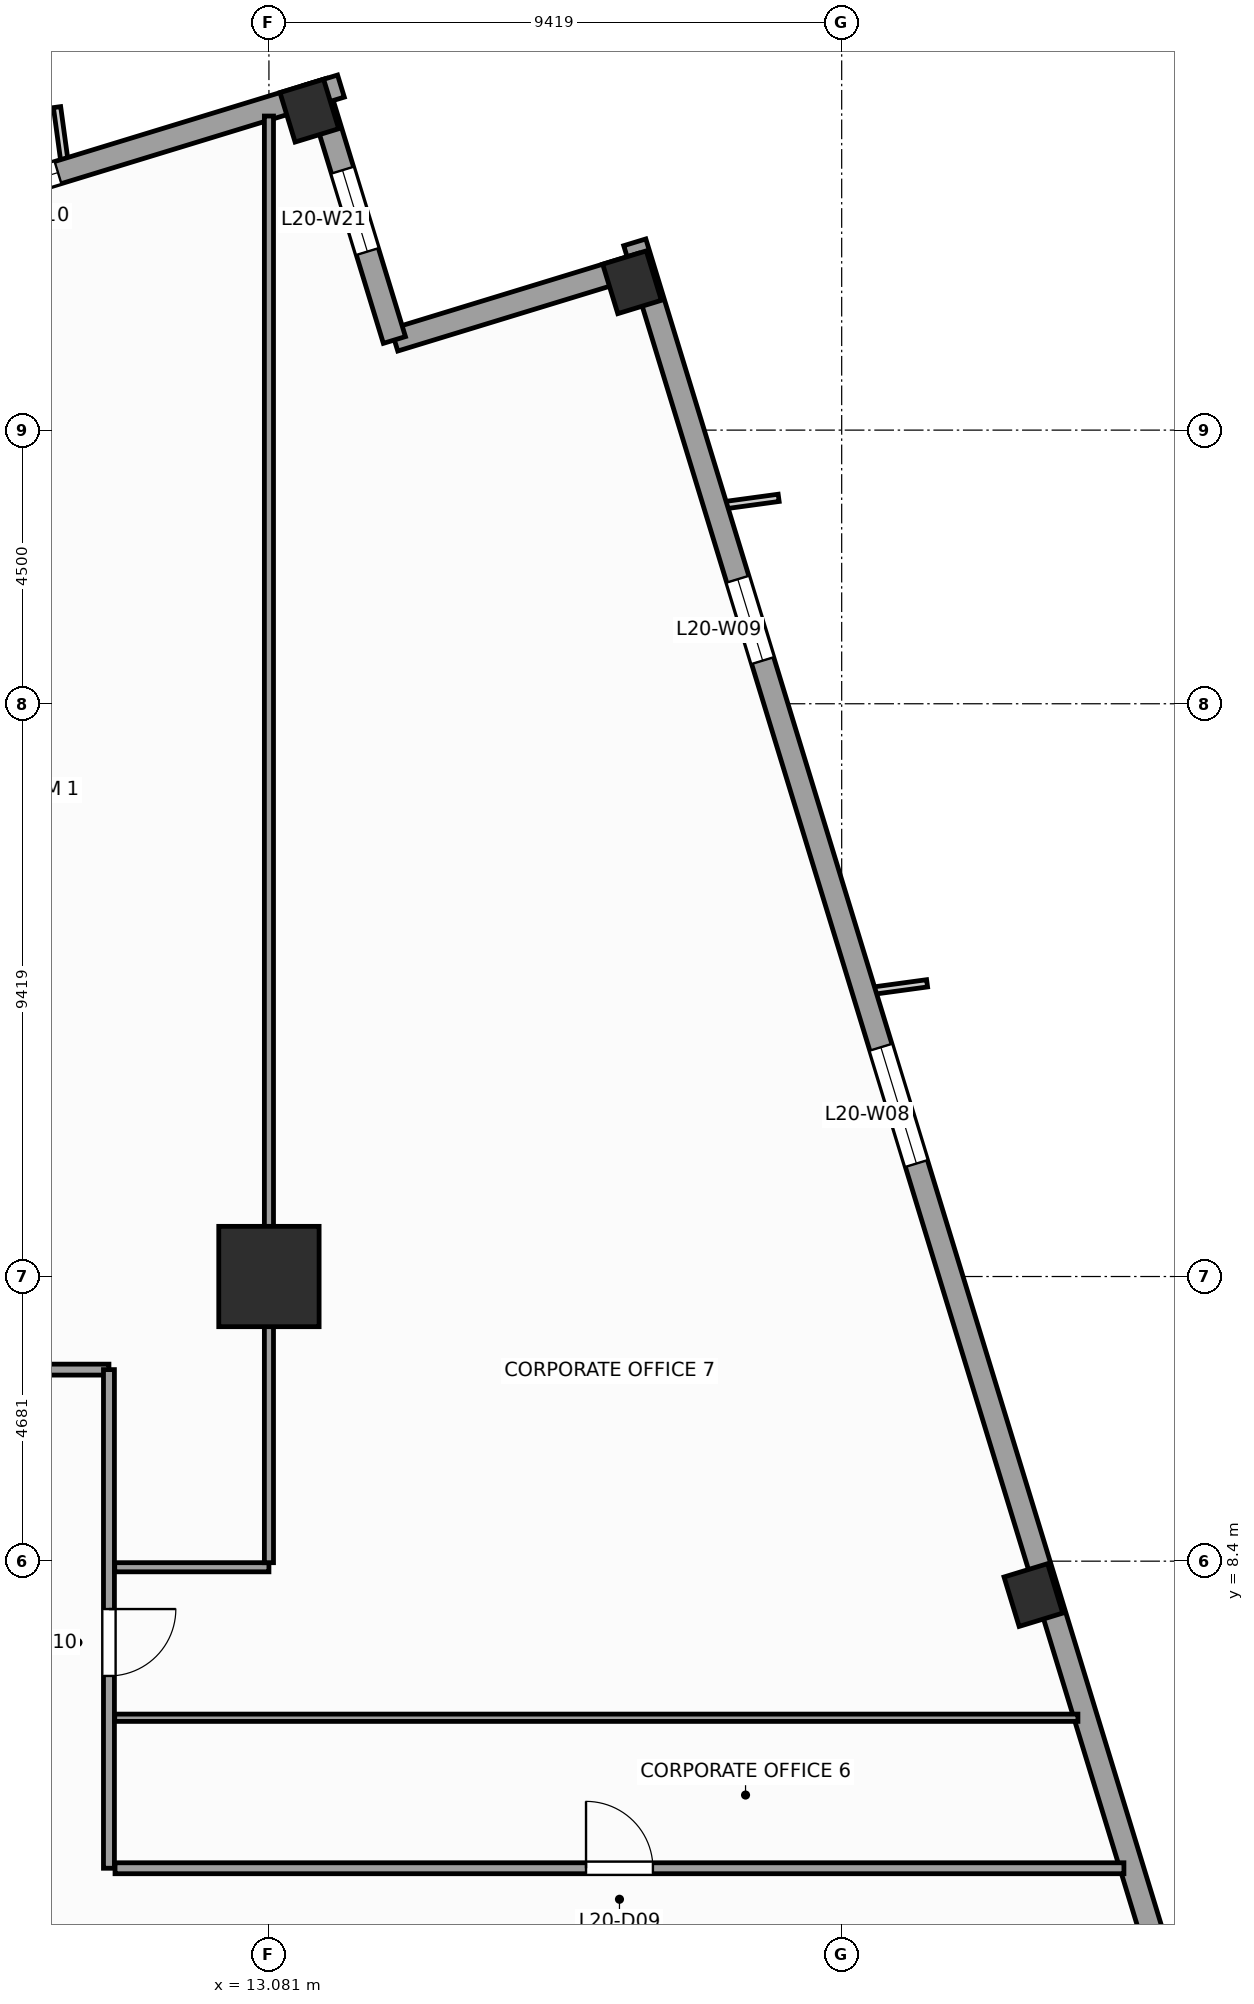
"""IFC4 building model, lengths in metres.
Left out: names, types, materials, properties, quantities, classifications, styles, units other than length and angle.
Written with IfcOpenShell. Run it as: python <this file> out.ifc"""

import sys

from ifc_helpers import new_model, si_unit, direction, frame, frame_2d, origin, origin_2d, place, context, subcontext, project, spatial, rectangle, extrude, source, transform, mapped, element, fill, save


model = new_model("IFC4")
c1 = context("Model", 3, precision=1e-05, world=origin(), true_north=direction((0.0, 1.0)))
c2 = subcontext(c1, "Body", "Model", "MODEL_VIEW")
j1 = project(units=[si_unit("LENGTHUNIT", "METRE"), si_unit("PLANEANGLEUNIT", "RADIAN")], contexts=[c1])
p1 = place(None, origin())
s1 = spatial("IfcSite", under=j1, at=p1, CompositionType="ELEMENT")
p2 = place(p1, origin())
s2 = spatial("IfcBuilding", under=s1, at=p2, CompositionType="ELEMENT")
p3 = place(p2, frame((0.0, 0.0, 87.2)))
s3 = spatial("IfcBuildingStorey", under=s2, at=p3, CompositionType="ELEMENT", Elevation=87.2)
m1 = source(origin(), c2, "Body", "SweptSolid", [
    extrude(rectangle(XDim=1.65, YDim=1.65, at=origin_2d()), origin(), (0.0, 0.0, 1.0), 4.0),
])
p4 = place(p3, frame((13.081, 13.081, 0.0), z_axis=(0.0, 0.0, 1.0), x_axis=(1.0, 0.0, 0.0)))
e1 = element("IfcColumn", 1, at=p4, inside=s3, PredefinedType="COLUMN", context=c2, shape_type="MappedRepresentation", body=[
    mapped(m1, transform((0.0, 0.0, 0.0), scale=1.0)),
])
m2 = source(origin(), c2, "Body", "SweptSolid", [
    extrude(rectangle(XDim=0.75, YDim=0.85, at=origin_2d()), origin(), (0.0, 0.0, 1.0), 4.0),
])
for number, where, z_axis, x_axis in (
    (2, (25.653, 7.843, 0.0), (0.0, 0.0, 1.0), (0.956, 0.292, 0.0)),
    (3, (19.052, 29.431, 0.0), (0.0, 0.0, 1.0), (0.956, 0.292, 0.0)),
    (4, (13.746, 32.253, 0.0), (0.0, 0.0, 1.0), (0.956, 0.292, 0.0)),
):
    element("IfcColumn", number, at=place(p3, frame(where, z_axis=z_axis, x_axis=x_axis)), inside=s3, PredefinedType="COLUMN", context=c2, shape_type="MappedRepresentation", body=[
        mapped(m2, transform((0.0, 0.0, 0.0), scale=1.0)),
    ])
p5 = place(p3, frame((32.658, -14.265, 0.0), z_axis=(0.0, 0.0, 1.0), x_axis=(-0.292373127906, 0.956304320851, 0.0)))
e5 = element("IfcWall", 5, at=p5, inside=s3, PredefinedType="STANDARD", context=c2, shape_type="SweptSolid", body=[
    extrude(rectangle(XDim=46.38, YDim=0.38, at=frame_2d((23.19, 0.0))), origin(), (0.0, 0.0, 1.0), 3.14),
])
p6 = place(p5, frame((4.865, 0.0, 0.51)))
e6 = element("IfcOpeningElement", 6, at=p6, cuts=e5, PredefinedType="OPENING", context=c2, shape_type="SweptSolid", body=[
    extrude(rectangle(XDim=1.4, YDim=2.4, at=frame_2d((0.7, 1.2))), frame((0.0, 0.2, 0.0), z_axis=(0.0, -1.0, 0.0), x_axis=(1.0, 0.0, 0.0)), (0.0, 0.0, 1.0), 0.4),
])
p7 = place(p5, frame((12.45, 0.0, 0.51)))
e7 = element("IfcOpeningElement", 7, at=p7, cuts=e5, PredefinedType="OPENING", context=c2, shape_type="SweptSolid", body=[
    extrude(rectangle(XDim=2.0, YDim=2.4, at=frame_2d((1.0, 1.2))), frame((0.0, 0.2, 0.0), z_axis=(0.0, -1.0, 0.0), x_axis=(1.0, 0.0, 0.0)), (0.0, 0.0, 1.0), 0.4),
])
p8 = place(p5, frame((30.538, 0.0, 0.51)))
e8 = element("IfcOpeningElement", 8, at=p8, cuts=e5, PredefinedType="OPENING", context=c2, shape_type="SweptSolid", body=[
    extrude(rectangle(XDim=2.0, YDim=2.4, at=frame_2d((1.0, 1.2))), frame((0.0, 0.2, 0.0), z_axis=(0.0, -1.0, 0.0), x_axis=(1.0, 0.0, 0.0)), (0.0, 0.0, 1.0), 0.4),
])
p9 = place(p5, frame((39.187, 0.0, 0.51)))
e9 = element("IfcOpeningElement", 9, at=p9, cuts=e5, PredefinedType="OPENING", context=c2, shape_type="SweptSolid", body=[
    extrude(rectangle(XDim=1.4, YDim=2.4, at=frame_2d((0.7, 1.2))), frame((0.0, 0.2, 0.0), z_axis=(0.0, -1.0, 0.0), x_axis=(1.0, 0.0, 0.0)), (0.0, 0.0, 1.0), 0.4),
])
p10 = place(p3, frame((19.208, 29.725, 0.0), z_axis=(0.0, 0.0, 1.0), x_axis=(-0.956312764915, -0.292345507338, 0.0)))
e10 = element("IfcWall", 10, at=p10, inside=s3, PredefinedType="STANDARD", context=c2, shape_type="SweptSolid", body=[
    extrude(rectangle(XDim=4.25, YDim=0.38, at=frame_2d((2.125, 0.0))), origin(), (0.0, 0.0, 1.0), 3.74),
])
p11 = place(p3, frame((15.144, 28.482, 0.0), z_axis=(0.0, 0.0, 1.0), x_axis=(-0.292373601522, 0.956304176051, 0.0)))
e11 = element("IfcWall", 11, at=p11, inside=s3, PredefinedType="STANDARD", context=c2, shape_type="SweptSolid", body=[
    extrude(rectangle(XDim=4.44, YDim=0.38, at=frame_2d((2.22, 0.0))), origin(), (0.0, 0.0, 1.0), 3.04),
])
p12 = place(p11, frame((1.52, 0.0, 0.51)))
e12 = element("IfcOpeningElement", 12, at=p12, cuts=e11, PredefinedType="OPENING", context=c2, shape_type="SweptSolid", body=[
    extrude(rectangle(XDim=1.4, YDim=2.4, at=frame_2d((0.7, 1.2))), frame((0.0, 0.2, 0.0), z_axis=(0.0, -1.0, 0.0), x_axis=(1.0, 0.0, 0.0)), (0.0, 0.0, 1.0), 0.4),
])
p13 = place(p3, frame((14.265, 32.658, 0.0), z_axis=(0.0, 0.0, 1.0), x_axis=(-0.956304320851, -0.292373127906, 0.0)))
e13 = element("IfcWall", 13, at=p13, inside=s3, PredefinedType="STANDARD", context=c2, shape_type="SweptSolid", body=[
    extrude(rectangle(XDim=46.38, YDim=0.38, at=frame_2d((23.19, 0.0))), origin(), (0.0, 0.0, 1.0), 3.14),
])
p14 = place(p13, frame((29.115, 0.0, 0.0)))
e14 = element("IfcOpeningElement", 14, at=p14, cuts=e13, PredefinedType="OPENING", context=c2, shape_type="SweptSolid", body=[
    extrude(rectangle(XDim=1.05, YDim=2.25, at=frame_2d((0.525, 1.125))), frame((0.0, 0.2, 0.0), z_axis=(0.0, -1.0, 0.0), x_axis=(1.0, 0.0, 0.0)), (0.0, 0.0, 1.0), 0.4),
])
p15 = place(p13, frame((4.865, 0.0, 0.51)))
e15 = element("IfcOpeningElement", 15, at=p15, cuts=e13, PredefinedType="OPENING", context=c2, shape_type="SweptSolid", body=[
    extrude(rectangle(XDim=1.4, YDim=2.4, at=frame_2d((0.7, 1.2))), frame((0.0, 0.2, 0.0), z_axis=(0.0, -1.0, 0.0), x_axis=(1.0, 0.0, 0.0)), (0.0, 0.0, 1.0), 0.4),
])
p16 = place(p13, frame((12.45, 0.0, 0.51)))
e16 = element("IfcOpeningElement", 16, at=p16, cuts=e13, PredefinedType="OPENING", context=c2, shape_type="SweptSolid", body=[
    extrude(rectangle(XDim=2.0, YDim=2.4, at=frame_2d((1.0, 1.2))), frame((0.0, 0.2, 0.0), z_axis=(0.0, -1.0, 0.0), x_axis=(1.0, 0.0, 0.0)), (0.0, 0.0, 1.0), 0.4),
])
p17 = place(p13, frame((19.012, 0.0, 0.51)))
e17 = element("IfcOpeningElement", 17, at=p17, cuts=e13, PredefinedType="OPENING", context=c2, shape_type="SweptSolid", body=[
    extrude(rectangle(XDim=2.0, YDim=2.4, at=frame_2d((1.0, 1.2))), frame((0.0, 0.2, 0.0), z_axis=(0.0, -1.0, 0.0), x_axis=(1.0, 0.0, 0.0)), (0.0, 0.0, 1.0), 0.4),
])
p18 = place(p13, frame((31.288, 0.0, 0.51)))
e18 = element("IfcOpeningElement", 18, at=p18, cuts=e13, PredefinedType="OPENING", context=c2, shape_type="SweptSolid", body=[
    extrude(rectangle(XDim=2.0, YDim=2.4, at=frame_2d((1.0, 1.2))), frame((0.0, 0.2, 0.0), z_axis=(0.0, -1.0, 0.0), x_axis=(1.0, 0.0, 0.0)), (0.0, 0.0, 1.0), 0.4),
])
p19 = place(p13, frame((39.187, 0.0, 0.51)))
e19 = element("IfcOpeningElement", 19, at=p19, cuts=e13, PredefinedType="OPENING", context=c2, shape_type="SweptSolid", body=[
    extrude(rectangle(XDim=1.4, YDim=2.4, at=frame_2d((0.7, 1.2))), frame((0.0, 0.2, 0.0), z_axis=(0.0, -1.0, 0.0), x_axis=(1.0, 0.0, 0.0)), (0.0, 0.0, 1.0), 0.4),
])
p20 = place(p3, frame((-12.6, 11.55, 0.0), z_axis=(0.0, 0.0, 1.0), x_axis=(1.0, 0.0, 0.0)))
e20 = element("IfcWall", 20, at=p20, inside=s3, PredefinedType="PARTITIONING", context=c2, shape_type="SweptSolid", body=[
    extrude(rectangle(XDim=23.05, YDim=0.18, at=frame_2d((11.525, 0.0))), origin(), (0.0, 0.0, 1.0), 3.74),
])
p21 = place(p20, frame((2.514, 0.0, 0.0)))
e21 = element("IfcOpeningElement", 21, at=p21, cuts=e20, PredefinedType="OPENING", context=c2, shape_type="SweptSolid", body=[
    extrude(rectangle(XDim=1.1, YDim=2.2, at=frame_2d((0.55, 1.1))), frame((0.0, 0.1, 0.0), z_axis=(0.0, -1.0, 0.0), x_axis=(1.0, 0.0, 0.0)), (0.0, 0.0, 1.0), 0.2),
])
p22 = place(p20, frame((8.05, 0.0, 0.0)))
e22 = element("IfcOpeningElement", 22, at=p22, cuts=e20, PredefinedType="OPENING", context=c2, shape_type="SweptSolid", body=[
    extrude(rectangle(XDim=1.1, YDim=2.2, at=frame_2d((0.55, 1.1))), frame((0.0, 0.1, 0.0), z_axis=(0.0, -1.0, 0.0), x_axis=(1.0, 0.0, 0.0)), (0.0, 0.0, 1.0), 0.2),
])
p23 = place(p20, frame((13.65, 0.0, 0.0)))
e23 = element("IfcOpeningElement", 23, at=p23, cuts=e20, PredefinedType="OPENING", context=c2, shape_type="SweptSolid", body=[
    extrude(rectangle(XDim=1.1, YDim=2.2, at=frame_2d((0.55, 1.1))), frame((0.0, 0.1, 0.0), z_axis=(0.0, -1.0, 0.0), x_axis=(1.0, 0.0, 0.0)), (0.0, 0.0, 1.0), 0.2),
])
p24 = place(p20, frame((19.311, 0.0, 0.0)))
e24 = element("IfcOpeningElement", 24, at=p24, cuts=e20, PredefinedType="OPENING", context=c2, shape_type="SweptSolid", body=[
    extrude(rectangle(XDim=1.1, YDim=2.2, at=frame_2d((0.55, 1.1))), frame((0.0, 0.1, 0.0), z_axis=(0.0, -1.0, 0.0), x_axis=(1.0, 0.0, 0.0)), (0.0, 0.0, 1.0), 0.2),
])
p25 = place(p3, frame((10.45, 3.35, 0.0), z_axis=(0.0, 0.0, 1.0), x_axis=(0.0, 1.0, 0.0)))
e25 = element("IfcWall", 25, at=p25, inside=s3, PredefinedType="PARTITIONING", context=c2, shape_type="SweptSolid", body=[
    extrude(rectangle(XDim=8.2, YDim=0.18, at=frame_2d((4.1, 0.0))), origin(), (0.0, 0.0, 1.0), 3.74),
])
p26 = place(p25, frame((3.163, 0.0, 0.0)))
e26 = element("IfcOpeningElement", 26, at=p26, cuts=e25, PredefinedType="OPENING", context=c2, shape_type="SweptSolid", body=[
    extrude(rectangle(XDim=1.1, YDim=2.2, at=frame_2d((0.55, 1.1))), frame((0.0, 0.1, 0.0), z_axis=(0.0, -1.0, 0.0), x_axis=(1.0, 0.0, 0.0)), (0.0, 0.0, 1.0), 0.2),
])
p27 = place(p3, frame((10.55, 3.35, 0.0), z_axis=(0.0, 0.0, 1.0), x_axis=(1.0, 0.0, 0.0)))
e27 = element("IfcWall", 27, at=p27, inside=s3, PredefinedType="PARTITIONING", context=c2, shape_type="SweptSolid", body=[
    extrude(rectangle(XDim=16.592, YDim=0.18, at=frame_2d((8.296, 0.0))), origin(), (0.0, 0.0, 1.0), 3.74),
])
p28 = place(p27, frame((7.746, 0.0, 0.0)))
e28 = element("IfcOpeningElement", 28, at=p28, cuts=e27, PredefinedType="OPENING", context=c2, shape_type="SweptSolid", body=[
    extrude(rectangle(XDim=1.1, YDim=2.2, at=frame_2d((0.55, 1.1))), frame((0.0, 0.1, 0.0), z_axis=(0.0, -1.0, 0.0), x_axis=(1.0, 0.0, 0.0)), (0.0, 0.0, 1.0), 0.2),
])
p29 = place(p3, frame((10.545, 8.3, 0.0), z_axis=(0.0, 0.0, 1.0), x_axis=(1.0, 0.0, 0.0)))
e29 = element("IfcWall", 29, at=p29, inside=s3, PredefinedType="PARTITIONING", context=c2, shape_type="SweptSolid", body=[
    extrude(rectangle(XDim=2.536, YDim=0.15, at=frame_2d((1.268, 0.0))), origin(), (0.0, 0.0, 1.0), 3.74),
])
p30 = place(p3, frame((13.081, 8.375, 0.0), z_axis=(0.0, 0.0, 1.0), x_axis=(0.0, 1.0, 0.0)))
e30 = element("IfcWall", 30, at=p30, inside=s3, PredefinedType="PARTITIONING", context=c2, shape_type="SweptSolid", body=[
    extrude(rectangle(XDim=23.79, YDim=0.15, at=frame_2d((11.895, 0.0))), origin(), (0.0, 0.0, 1.0), 2.732),
])
p31 = place(p3, frame((10.545, 5.825, 0.0), z_axis=(0.0, 0.0, 1.0), x_axis=(1.0, 0.0, 0.0)))
e31 = element("IfcWall", 31, at=p31, inside=s3, PredefinedType="PARTITIONING", context=c2, shape_type="SweptSolid", body=[
    extrude(rectangle(XDim=15.84, YDim=0.12, at=frame_2d((7.92, 0.0))), origin(), (0.0, 0.0, 1.0), 3.74),
])
m3 = source(origin(), c2, "Body", "SweptSolid", [
    extrude(rectangle(XDim=2.0, YDim=2.4, at=frame_2d((1.0, 1.2))), frame((0.0, 0.03, 0.0), z_axis=(0.0, -1.0, 0.0), x_axis=(1.0, 0.0, 0.0)), (0.0, 0.0, 1.0), 0.06),
])
p32 = place(p8, origin())
e32 = element("IfcWindow", 32, at=p32, inside=s3, PartitioningType="SINGLE_PANEL", PredefinedType="WINDOW", context=c2, shape_type="MappedRepresentation", body=[
    mapped(m3, transform((0.0, 0.0, 0.0), scale=1.0)),
])
fill(e8, e32)
m4 = source(origin(), c2, "Body", "SweptSolid", [
    extrude(rectangle(XDim=1.4, YDim=2.4, at=frame_2d((0.7, 1.2))), frame((0.0, 0.03, 0.0), z_axis=(0.0, -1.0, 0.0), x_axis=(1.0, 0.0, 0.0)), (0.0, 0.0, 1.0), 0.06),
])
p33 = place(p9, origin())
e33 = element("IfcWindow", 33, at=p33, inside=s3, PartitioningType="SINGLE_PANEL", PredefinedType="WINDOW", context=c2, shape_type="MappedRepresentation", body=[
    mapped(m4, transform((0.0, 0.0, 0.0), scale=1.0)),
])
fill(e9, e33)
p34 = place(p15, origin())
e34 = element("IfcWindow", 34, at=p34, inside=s3, PartitioningType="SINGLE_PANEL", PredefinedType="WINDOW", context=c2, shape_type="MappedRepresentation", body=[
    mapped(m4, transform((0.0, 0.0, 0.0), scale=1.0)),
])
fill(e15, e34)
p35 = place(p12, origin())
e35 = element("IfcWindow", 35, at=p35, inside=s3, PartitioningType="SINGLE_PANEL", PredefinedType="WINDOW", context=c2, shape_type="MappedRepresentation", body=[
    mapped(m4, transform((0.0, 0.0, 0.0), scale=1.0)),
])
fill(e12, e35)
m5 = source(origin(), c2, "Body", "SweptSolid", [
    extrude(rectangle(XDim=1.1, YDim=2.2, at=frame_2d((0.55, 1.1))), frame((0.0, 0.025, 0.0), z_axis=(0.0, -1.0, 0.0), x_axis=(1.0, 0.0, 0.0)), (0.0, 0.0, 1.0), 0.05),
])
p36 = place(p28, origin())
e36 = element("IfcDoor", 36, at=p36, inside=s3, OperationType="SINGLE_SWING_LEFT", PredefinedType="DOOR", context=c2, shape_type="MappedRepresentation", body=[
    mapped(m5, transform((0.0, 0.0, 0.0), scale=1.0)),
])
fill(e28, e36)
p37 = place(p26, frame((1.1, 0.0, 0.0), z_axis=(0.0, 0.0, 1.0), x_axis=(-1.0, 0.0, 0.0)))
e37 = element("IfcDoor", 37, at=p37, inside=s3, OperationType="SINGLE_SWING_RIGHT", PredefinedType="DOOR", context=c2, shape_type="MappedRepresentation", body=[
    mapped(m5, transform((0.0, 0.0, 0.0), scale=1.0)),
])
fill(e26, e37)
save(model, sys.argv[1])
